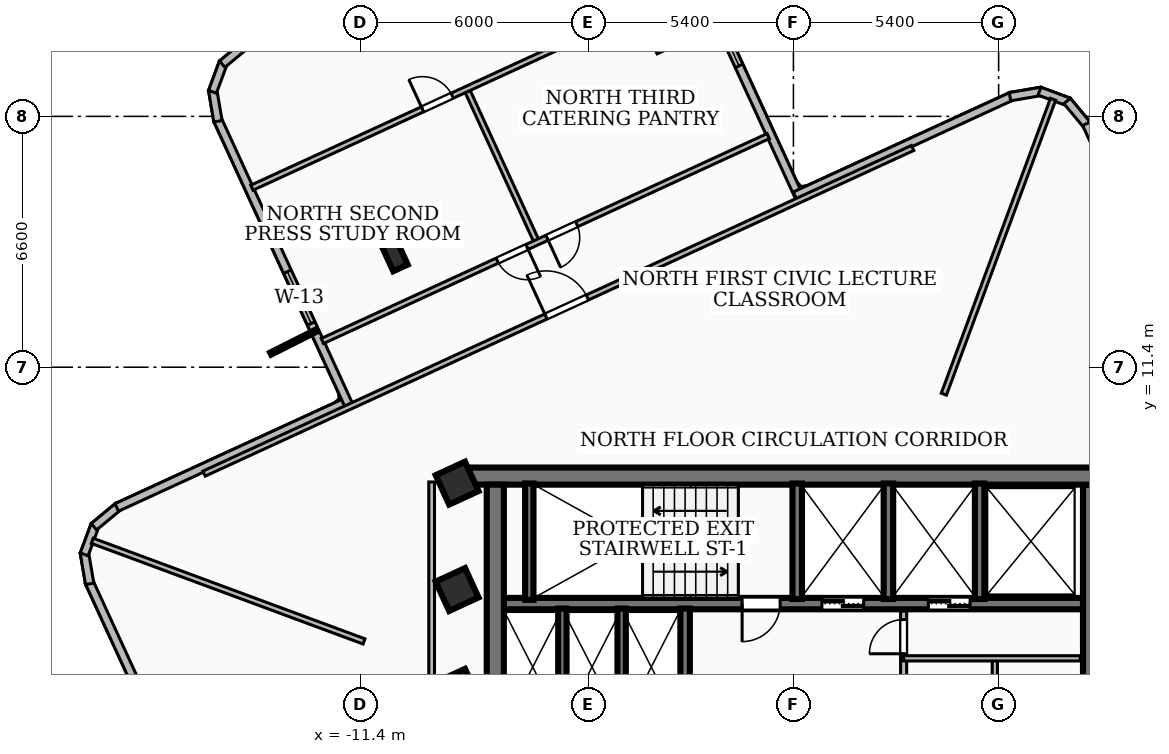
"""IFC4 building model, lengths in metres.
Left out: names, types, materials, properties, quantities, classifications, styles, units other than length and angle.
Written with IfcOpenShell. Run it as: python <this file> out.ifc"""

import sys

from ifc_helpers import new_model, si_unit, direction, frame, frame_2d, origin, origin_2d, place, context, subcontext, project, spatial, rectangle, i_section, extrude, element, fill, save


model = new_model("IFC4")
c1 = context("Model", 3, precision=1e-05, world=origin(), true_north=direction((0.0, 1.0)))
c2 = subcontext(c1, "Body", "Model", "MODEL_VIEW")
j1 = project(units=[si_unit("LENGTHUNIT", "METRE"), si_unit("PLANEANGLEUNIT", "RADIAN")], contexts=[c1])
p1 = place(None, origin())
s1 = spatial("IfcSite", under=j1, at=p1, CompositionType="ELEMENT")
p2 = place(p1, origin())
s2 = spatial("IfcBuilding", under=s1, at=p2, CompositionType="ELEMENT")
p3 = place(p2, frame((0.0, 0.0, 184.68)))
s3 = spatial("IfcBuildingStorey", under=s2, at=p3, CompositionType="ELEMENT", Elevation=184.68)
p4 = place(p3, frame((-8.78, 8.535, 0.0), z_axis=(0.0, 0.0, 1.0), x_axis=(1.0, 0.0, 0.0)))
e1 = element("IfcWall", 1, at=p4, inside=s3, PredefinedType="SHEAR", context=c2, shape_type="SweptSolid", body=[
    extrude(rectangle(XDim=17.56, YDim=0.45, at=frame_2d((8.78, 0.0))), origin(), (0.0, 0.0, 1.0), 3.34),
])
for number, where, z_axis, x_axis in (
    (2, (-7.845, 1.975, 0.0), (0.0, 0.0, 1.0), (0.0, 1.0, 0.0)),
    (3, (7.845, 8.31, 0.0), (0.0, 0.0, 1.0), (0.0, -1.0, 0.0)),
):
    element("IfcWall", number, at=place(p3, frame(where, z_axis=z_axis, x_axis=x_axis)), inside=s3, PredefinedType="SHEAR", context=c2, shape_type="SweptSolid", body=[
        extrude(rectangle(XDim=6.335, YDim=0.45, at=frame_2d((3.167, 0.0))), origin(), (0.0, 0.0, 1.0), 3.34),
    ])
p5 = place(p3, frame((7.62, 5.18, 0.0), z_axis=(0.0, 0.0, 1.0), x_axis=(-1.0, 0.0, 0.0)))
e4 = element("IfcWall", 4, at=p5, inside=s3, PredefinedType="SOLIDWALL", context=c2, shape_type="SweptSolid", body=[
    extrude(rectangle(XDim=15.24, YDim=0.3, at=frame_2d((7.62, 0.0))), origin(), (0.0, 0.0, 1.0), 3.34),
])
p6 = place(p5, frame((5.77, 0.0, 0.0)))
e5 = element("IfcOpeningElement", 5, at=p6, cuts=e4, PredefinedType="OPENING", context=c2, shape_type="SweptSolid", body=[
    extrude(rectangle(XDim=1.1, YDim=2.15, at=frame_2d((0.55, 1.075))), frame((0.0, 0.16, 0.0), z_axis=(0.0, -1.0, 0.0), x_axis=(1.0, 0.0, 0.0)), (0.0, 0.0, 1.0), 0.32),
])
p7 = place(p5, frame((2.97, 0.0, 0.0)))
e6 = element("IfcOpeningElement", 6, at=p7, cuts=e4, PredefinedType="OPENING", context=c2, shape_type="SweptSolid", body=[
    extrude(rectangle(XDim=1.1, YDim=2.15, at=frame_2d((0.55, 1.075))), frame((0.0, 0.16, 0.0), z_axis=(0.0, -1.0, 0.0), x_axis=(1.0, 0.0, 0.0)), (0.0, 0.0, 1.0), 0.32),
])
p8 = place(p5, frame((7.97, 0.0, 0.0)))
e7 = element("IfcOpeningElement", 7, at=p8, cuts=e4, PredefinedType="OPENING", context=c2, shape_type="SweptSolid", body=[
    extrude(rectangle(XDim=1.0, YDim=2.1, at=frame_2d((0.5, 1.05))), frame((0.0, 0.16, 0.0), z_axis=(0.0, -1.0, 0.0), x_axis=(1.0, 0.0, 0.0)), (0.0, 0.0, 1.0), 0.32),
])
p9 = place(p3, frame((-6.95, 5.28, 0.0), z_axis=(0.0, 0.0, 1.0), x_axis=(0.0, 1.0, 0.0)))
e8 = element("IfcWall", 8, at=p9, inside=s3, PredefinedType="SOLIDWALL", context=c2, shape_type="SweptSolid", body=[
    extrude(rectangle(XDim=3.06, YDim=0.22, at=frame_2d((1.53, 0.0))), origin(), (0.0, 0.0, 1.0), 3.34),
])
for number, where, z_axis, x_axis in (
    (9, (0.1, 5.3, 0.0), (0.0, 0.0, 1.0), (0.0, 1.0, 0.0)),
    (10, (2.5, 5.3, 0.0), (0.0, 0.0, 1.0), (0.0, 1.0, 0.0)),
    (11, (4.9, 5.3, 0.0), (0.0, 0.0, 1.0), (0.0, 1.0, 0.0)),
):
    element("IfcWall", number, at=place(p3, frame(where, z_axis=z_axis, x_axis=x_axis)), inside=s3, PredefinedType="SOLIDWALL", context=c2, shape_type="SweptSolid", body=[
        extrude(rectangle(XDim=3.04, YDim=0.25, at=frame_2d((1.52, 0.0))), origin(), (0.0, 0.0, 1.0), 3.34),
    ])
p10 = place(p3, frame((-2.85, 1.98, 0.0), z_axis=(0.0, 0.0, 1.0), x_axis=(0.0, 1.0, 0.0)))
e12 = element("IfcWall", 12, at=p10, inside=s3, PredefinedType="SOLIDWALL", context=c2, shape_type="SweptSolid", body=[
    extrude(rectangle(XDim=3.07, YDim=0.25, at=frame_2d((1.535, 0.0))), origin(), (0.0, 0.0, 1.0), 3.34),
])
for number, where, z_axis, x_axis in (
    (13, (-6.08, 1.98, 0.0), (0.0, 0.0, 1.0), (0.0, 1.0, 0.0)),
    (14, (-4.52, 1.98, 0.0), (0.0, 0.0, 1.0), (0.0, 1.0, 0.0)),
):
    element("IfcWall", number, at=place(p3, frame(where, z_axis=z_axis, x_axis=x_axis)), inside=s3, PredefinedType="SOLIDWALL", context=c2, shape_type="SweptSolid", body=[
        extrude(rectangle(XDim=3.07, YDim=0.22, at=frame_2d((1.535, 0.0))), origin(), (0.0, 0.0, 1.0), 3.34),
    ])
for number, where, z_axis, x_axis in (
    (15, (-8.85, 2.9, 0.0), (0.0, 0.0, 1.0), (0.909, 0.418, 0.0)),
    (16, (-8.85, 5.55, 0.0), (0.0, 0.0, 1.0), (0.909, 0.418, 0.0)),
    (17, (-8.85, 8.35, 0.0), (0.0, 0.0, 1.0), (0.909, 0.418, 0.0)),
):
    element("IfcColumn", number, at=place(p3, frame(where, z_axis=z_axis, x_axis=x_axis)), inside=s3, PredefinedType="COLUMN", context=c2, shape_type="SweptSolid", body=[
        extrude(rectangle(XDim=0.85, YDim=0.85, at=origin_2d()), origin(), (0.0, 0.0, 1.0), 3.6),
    ])
p11 = place(p3, frame((-10.533, 14.433, 0.0), z_axis=(0.0, 0.0, 1.0), x_axis=(0.9086539853, 0.41754991917, 0.0)))
e18 = element("IfcColumn", 18, at=p11, inside=s3, PredefinedType="COLUMN", context=c2, shape_type="SweptSolid", body=[
    extrude(i_section(OverallWidth=0.418, OverallDepth=0.927, WebThickness=0.019, FlangeThickness=0.032, at=origin_2d()), origin(), (0.0, 0.0, 1.0), 3.6),
])
p12 = place(p3, frame((-15.911, 0.042, 0.0), z_axis=(0.0, 0.0, 1.0), x_axis=(-0.417479344719, 0.908686412759, 0.0)))
e19 = element("IfcWall", 19, at=p12, inside=s3, PredefinedType="SOLIDWALL", context=c2, shape_type="SweptSolid", body=[
    extrude(rectangle(XDim=6.278, YDim=0.22, at=frame_2d((3.139, 0.0))), origin(), (0.0, 0.0, 1.0), 3.34),
])
p13 = place(p3, frame((-18.518, 5.699, 0.0), z_axis=(0.0, 0.0, 1.0), x_axis=(-0.167382556682, 0.985892022342, 0.0)))
e20 = element("IfcWall", 20, at=p13, inside=s3, PredefinedType="SOLIDWALL", context=c2, shape_type="SweptSolid", body=[
    extrude(rectangle(XDim=0.836, YDim=0.22, at=frame_2d((0.418, 0.0))), origin(), (0.0, 0.0, 1.0), 3.34),
])
p14 = place(p3, frame((-18.663, 6.475, 0.0), z_axis=(0.0, 0.0, 1.0), x_axis=(0.348538641681, 0.937294412261, 0.0)))
e21 = element("IfcWall", 21, at=p14, inside=s3, PredefinedType="SOLIDWALL", context=c2, shape_type="SweptSolid", body=[
    extrude(rectangle(XDim=0.818, YDim=0.22, at=frame_2d((0.409, 0.0))), origin(), (0.0, 0.0, 1.0), 3.34),
])
p15 = place(p3, frame((-18.406, 7.203, 0.0), z_axis=(0.0, 0.0, 1.0), x_axis=(0.769323077261, 0.638859924235, 0.0)))
e22 = element("IfcWall", 22, at=p15, inside=s3, PredefinedType="SOLIDWALL", context=c2, shape_type="SweptSolid", body=[
    extrude(rectangle(XDim=0.835, YDim=0.22, at=frame_2d((0.417, 0.0))), origin(), (0.0, 0.0, 1.0), 3.34),
])
p16 = place(p3, frame((-17.806, 7.71, 0.0), z_axis=(0.0, 0.0, 1.0), x_axis=(0.908646468859, 0.417566275734, 0.0)))
e23 = element("IfcWall", 23, at=p16, inside=s3, PredefinedType="SOLIDWALL", context=c2, shape_type="SweptSolid", body=[
    extrude(rectangle(XDim=6.758, YDim=0.22, at=frame_2d((3.379, 0.0))), origin(), (0.0, 0.0, 1.0), 3.34),
])
p17 = place(p3, frame((-11.708, 10.415, 0.0), z_axis=(0.0, 0.0, 1.0), x_axis=(-0.417525901293, 0.908665021748, 0.0)))
e24 = element("IfcWall", 24, at=p17, inside=s3, PredefinedType="SOLIDWALL", context=c2, shape_type="SweptSolid", body=[
    extrude(rectangle(XDim=8.258, YDim=0.22, at=frame_2d((4.129, 0.0))), origin(), (0.0, 0.0, 1.0), 3.34),
])
p18 = place(p17, frame((2.35, 0.0, 0.85)))
e25 = element("IfcOpeningElement", 25, at=p18, cuts=e24, PredefinedType="OPENING", context=c2, shape_type="SweptSolid", body=[
    extrude(rectangle(XDim=1.5, YDim=1.8, at=frame_2d((0.75, 0.9))), frame((0.0, 0.12, 0.0), z_axis=(0.0, -1.0, 0.0), x_axis=(1.0, 0.0, 0.0)), (0.0, 0.0, 1.0), 0.24),
])
p19 = place(p3, frame((-15.142, 17.871, 0.0), z_axis=(0.0, 0.0, 1.0), x_axis=(-0.167575597201, 0.985859228908, 0.0)))
e26 = element("IfcWall", 26, at=p19, inside=s3, PredefinedType="SOLIDWALL", context=c2, shape_type="SweptSolid", body=[
    extrude(rectangle(XDim=0.835, YDim=0.22, at=frame_2d((0.417, 0.0))), origin(), (0.0, 0.0, 1.0), 3.34),
])
p20 = place(p3, frame((-15.287, 18.646, 0.0), z_axis=(0.0, 0.0, 1.0), x_axis=(0.348051853522, 0.937475283546, 0.0)))
e27 = element("IfcWall", 27, at=p20, inside=s3, PredefinedType="SOLIDWALL", context=c2, shape_type="SweptSolid", body=[
    extrude(rectangle(XDim=0.819, YDim=0.22, at=frame_2d((0.41, 0.0))), origin(), (0.0, 0.0, 1.0), 3.34),
])
p21 = place(p3, frame((-15.03, 19.375, 0.0), z_axis=(0.0, 0.0, 1.0), x_axis=(0.770042109777, 0.637993063576, 0.0)))
e28 = element("IfcWall", 28, at=p21, inside=s3, PredefinedType="SOLIDWALL", context=c2, shape_type="SweptSolid", body=[
    extrude(rectangle(XDim=0.834, YDim=0.22, at=frame_2d((0.417, 0.0))), origin(), (0.0, 0.0, 1.0), 3.34),
])
p22 = place(p3, frame((-3.289, 23.372, 0.0), z_axis=(0.0, 0.0, 1.0), x_axis=(0.417514685416, -0.90867017529, 0.0)))
e29 = element("IfcWall", 29, at=p22, inside=s3, PredefinedType="SOLIDWALL", context=c2, shape_type="SweptSolid", body=[
    extrude(rectangle(XDim=8.258, YDim=0.22, at=frame_2d((4.129, 0.0))), origin(), (0.0, 0.0, 1.0), 3.34),
])
p23 = place(p22, frame((2.35, 0.0, 0.85)))
e30 = element("IfcOpeningElement", 30, at=p23, cuts=e29, PredefinedType="OPENING", context=c2, shape_type="SweptSolid", body=[
    extrude(rectangle(XDim=2.1, YDim=1.8, at=frame_2d((1.05, 0.9))), frame((0.0, 0.12, 0.0), z_axis=(0.0, -1.0, 0.0), x_axis=(1.0, 0.0, 0.0)), (0.0, 0.0, 1.0), 0.24),
])
p24 = place(p3, frame((0.042, 15.911, 0.0), z_axis=(0.0, 0.0, 1.0), x_axis=(0.908686412759, 0.417479344719, 0.0)))
e31 = element("IfcWall", 31, at=p24, inside=s3, PredefinedType="SOLIDWALL", context=c2, shape_type="SweptSolid", body=[
    extrude(rectangle(XDim=6.278, YDim=0.22, at=frame_2d((3.139, 0.0))), origin(), (0.0, 0.0, 1.0), 3.34),
])
p25 = place(p3, frame((5.699, 18.518, 0.0), z_axis=(0.0, 0.0, 1.0), x_axis=(0.985892022342, 0.167382556682, 0.0)))
e32 = element("IfcWall", 32, at=p25, inside=s3, PredefinedType="SOLIDWALL", context=c2, shape_type="SweptSolid", body=[
    extrude(rectangle(XDim=0.836, YDim=0.22, at=frame_2d((0.418, 0.0))), origin(), (0.0, 0.0, 1.0), 3.34),
])
p26 = place(p3, frame((6.475, 18.663, 0.0), z_axis=(0.0, 0.0, 1.0), x_axis=(0.937294412261, -0.348538641681, 0.0)))
e33 = element("IfcWall", 33, at=p26, inside=s3, PredefinedType="SOLIDWALL", context=c2, shape_type="SweptSolid", body=[
    extrude(rectangle(XDim=0.818, YDim=0.22, at=frame_2d((0.409, 0.0))), origin(), (0.0, 0.0, 1.0), 3.34),
])
p27 = place(p3, frame((7.203, 18.406, 0.0), z_axis=(0.0, 0.0, 1.0), x_axis=(0.638859924235, -0.769323077261, 0.0)))
e34 = element("IfcWall", 34, at=p27, inside=s3, PredefinedType="SOLIDWALL", context=c2, shape_type="SweptSolid", body=[
    extrude(rectangle(XDim=0.835, YDim=0.22, at=frame_2d((0.417, 0.0))), origin(), (0.0, 0.0, 1.0), 3.34),
])
p28 = place(p3, frame((7.71, 17.806, 0.0), z_axis=(0.0, 0.0, 1.0), x_axis=(0.417566275734, -0.908646468859, 0.0)))
e35 = element("IfcWall", 35, at=p28, inside=s3, PredefinedType="SOLIDWALL", context=c2, shape_type="SweptSolid", body=[
    extrude(rectangle(XDim=6.758, YDim=0.22, at=frame_2d((3.379, 0.0))), origin(), (0.0, 0.0, 1.0), 3.34),
])
p29 = place(p3, frame((2.9, 2.04, 0.0), z_axis=(0.0, 0.0, 1.0), x_axis=(0.0, 1.0, 0.0)))
e36 = element("IfcWall", 36, at=p29, inside=s3, PredefinedType="PARTITIONING", context=c2, shape_type="SweptSolid", body=[
    extrude(rectangle(XDim=2.94, YDim=0.16, at=frame_2d((1.47, 0.0))), origin(), (0.0, 0.0, 1.0), 2.57),
])
p30 = place(p29, frame((1.82, 0.0, 0.0)))
e37 = element("IfcOpeningElement", 37, at=p30, cuts=e36, PredefinedType="OPENING", context=c2, shape_type="SweptSolid", body=[
    extrude(rectangle(XDim=0.9, YDim=2.06, at=frame_2d((0.45, 1.03))), frame((0.0, 0.09, 0.0), z_axis=(0.0, -1.0, 0.0), x_axis=(1.0, 0.0, 0.0)), (0.0, 0.0, 1.0), 0.18),
])
p31 = place(p3, frame((2.9, 3.74, 0.0), z_axis=(0.0, 0.0, 1.0), x_axis=(1.0, 0.0, 0.0)))
e38 = element("IfcWall", 38, at=p31, inside=s3, PredefinedType="PARTITIONING", context=c2, shape_type="SweptSolid", body=[
    extrude(rectangle(XDim=4.65, YDim=0.138, at=frame_2d((2.325, 0.0))), origin(), (0.0, 0.0, 1.0), 3.34),
])
p32 = place(p3, frame((5.3, 1.85, 0.0), z_axis=(0.0, 0.0, 1.0), x_axis=(0.0, 1.0, 0.0)))
e39 = element("IfcWall", 39, at=p32, inside=s3, PredefinedType="PARTITIONING", context=c2, shape_type="SweptSolid", body=[
    extrude(rectangle(XDim=1.89, YDim=0.138, at=frame_2d((0.945, 0.0))), origin(), (0.0, 0.0, 1.0), 2.57),
])
p33 = place(p3, frame((-9.52, 1.75, 0.0), z_axis=(0.0, 0.0, 1.0), x_axis=(0.0, 1.0, 0.0)))
e40 = element("IfcWall", 40, at=p33, inside=s3, PredefinedType="PARTITIONING", context=c2, shape_type="SweptSolid", body=[
    extrude(rectangle(XDim=6.63, YDim=0.15, at=frame_2d((3.315, 0.0))), origin(), (0.0, 0.0, 1.0), 3.34),
])
p34 = place(p3, frame((3.959, 10.691, 0.0), z_axis=(0.0, 0.0, 1.0), x_axis=(0.347243238044, 0.937775097576, 0.0)))
e41 = element("IfcWall", 41, at=p34, inside=s3, PredefinedType="PARTITIONING", context=c2, shape_type="SweptSolid", body=[
    extrude(rectangle(XDim=8.274, YDim=0.145, at=frame_2d((4.137, 0.0))), origin(), (0.0, 0.0, 1.0), 3.34),
])
p35 = place(p3, frame((-11.3, 4.185, 0.0), z_axis=(0.0, 0.0, 1.0), x_axis=(-0.937797421925, 0.347182942311, 0.0)))
e42 = element("IfcWall", 42, at=p35, inside=s3, PredefinedType="PARTITIONING", context=c2, shape_type="SweptSolid", body=[
    extrude(rectangle(XDim=7.624, YDim=0.145, at=frame_2d((3.812, 0.0))), origin(), (0.0, 0.0, 1.0), 3.34),
])
p36 = place(p3, frame((-15.508, 8.6, 0.0), z_axis=(0.0, 0.0, 1.0), x_axis=(0.908644148726, 0.41757132443, 0.0)))
e43 = element("IfcWall", 43, at=p36, inside=s3, PredefinedType="PARTITIONING", context=c2, shape_type="SweptSolid", body=[
    extrude(rectangle(XDim=20.521, YDim=0.145, at=frame_2d((10.26, 0.0))), origin(), (0.0, 0.0, 1.0), 2.644),
])
p37 = place(p36, frame((9.9, 0.0, 0.0)))
e44 = element("IfcOpeningElement", 44, at=p37, cuts=e43, PredefinedType="OPENING", context=c2, shape_type="SweptSolid", body=[
    extrude(rectangle(XDim=1.2, YDim=2.1, at=frame_2d((0.6, 1.05))), frame((0.0, 0.083, 0.0), z_axis=(0.0, -1.0, 0.0), x_axis=(1.0, 0.0, 0.0)), (0.0, 0.0, 1.0), 0.165),
])
p38 = place(p3, frame((-6.773, 14.738, 0.0), z_axis=(0.0, 0.0, 1.0), x_axis=(-0.417333699104, 0.908753312837, 0.0)))
e45 = element("IfcWall", 45, at=p38, inside=s3, PredefinedType="PARTITIONING", context=c2, shape_type="SweptSolid", body=[
    extrude(rectangle(XDim=4.32, YDim=0.145, at=frame_2d((2.16, 0.0))), origin(), (0.0, 0.0, 1.0), 3.34),
])
p39 = place(p3, frame((-0.664, 17.48, 0.0), z_axis=(0.0, 0.0, 1.0), x_axis=(-0.908648339266, -0.417562205605, 0.0)))
e46 = element("IfcWall", 46, at=p39, inside=s3, PredefinedType="PARTITIONING", context=c2, shape_type="SweptSolid", body=[
    extrude(rectangle(XDim=12.91, YDim=0.145, at=frame_2d((6.455, 0.0))), origin(), (0.0, 0.0, 1.0), 2.644),
])
p40 = place(p39, frame((5.545, 0.0, 0.0)))
e47 = element("IfcOpeningElement", 47, at=p40, cuts=e46, PredefinedType="OPENING", context=c2, shape_type="SweptSolid", body=[
    extrude(rectangle(XDim=0.86, YDim=2.04, at=frame_2d((0.43, 1.02))), frame((0.0, 0.083, 0.0), z_axis=(0.0, -1.0, 0.0), x_axis=(1.0, 0.0, 0.0)), (0.0, 0.0, 1.0), 0.165),
])
p41 = place(p39, frame((6.985, 0.0, 0.0)))
e48 = element("IfcOpeningElement", 48, at=p41, cuts=e46, PredefinedType="OPENING", context=c2, shape_type="SweptSolid", body=[
    extrude(rectangle(XDim=0.86, YDim=2.04, at=frame_2d((0.43, 1.02))), frame((0.0, 0.083, 0.0), z_axis=(0.0, -1.0, 0.0), x_axis=(1.0, 0.0, 0.0)), (0.0, 0.0, 1.0), 0.165),
])
p42 = place(p3, frame((-14.249, 16.123, 0.0), z_axis=(0.0, 0.0, 1.0), x_axis=(0.908677037864, 0.41749974953, 0.0)))
e49 = element("IfcWall", 49, at=p42, inside=s3, PredefinedType="PARTITIONING", context=c2, shape_type="SweptSolid", body=[
    extrude(rectangle(XDim=12.91, YDim=0.145, at=frame_2d((6.455, 0.0))), origin(), (0.0, 0.0, 1.0), 3.34),
])
p43 = place(p42, frame((4.94, 0.0, 0.0)))
e50 = element("IfcOpeningElement", 50, at=p43, cuts=e49, PredefinedType="OPENING", context=c2, shape_type="SweptSolid", body=[
    extrude(rectangle(XDim=0.86, YDim=2.04, at=frame_2d((0.43, 1.02))), frame((0.0, 0.083, 0.0), z_axis=(0.0, -1.0, 0.0), x_axis=(1.0, 0.0, 0.0)), (0.0, 0.0, 1.0), 0.165),
])
p44 = place(p18, origin())
e51 = element("IfcWindow", 51, at=p44, inside=s3, PartitioningType="SINGLE_PANEL", PredefinedType="WINDOW", context=c2, shape_type="SweptSolid", body=[
    extrude(rectangle(XDim=1.5, YDim=1.8, at=frame_2d((0.75, 0.9))), frame((0.0, 0.03, 0.0), z_axis=(0.0, -1.0, 0.0), x_axis=(1.0, 0.0, 0.0)), (0.0, 0.0, 1.0), 0.06),
])
fill(e25, e51)
p45 = place(p23, origin())
e52 = element("IfcWindow", 52, at=p45, inside=s3, PartitioningType="SINGLE_PANEL", PredefinedType="WINDOW", context=c2, shape_type="SweptSolid", body=[
    extrude(rectangle(XDim=2.1, YDim=1.8, at=frame_2d((1.05, 0.9))), frame((0.0, 0.03, 0.0), z_axis=(0.0, -1.0, 0.0), x_axis=(1.0, 0.0, 0.0)), (0.0, 0.0, 1.0), 0.06),
])
fill(e30, e52)
p46 = place(p6, origin())
e53 = element("IfcDoor", 53, at=p46, inside=s3, OperationType="DOUBLE_DOOR_SLIDING", PredefinedType="DOOR", context=c2, shape_type="SweptSolid", body=[
    extrude(rectangle(XDim=1.1, YDim=2.15, at=frame_2d((0.55, 1.075))), frame((0.0, 0.025, 0.0), z_axis=(0.0, -1.0, 0.0), x_axis=(1.0, 0.0, 0.0)), (0.0, 0.0, 1.0), 0.05),
])
fill(e5, e53)
p47 = place(p7, origin())
e54 = element("IfcDoor", 54, at=p47, inside=s3, OperationType="DOUBLE_DOOR_SLIDING", PredefinedType="DOOR", context=c2, shape_type="SweptSolid", body=[
    extrude(rectangle(XDim=1.1, YDim=2.15, at=frame_2d((0.55, 1.075))), frame((0.0, 0.025, 0.0), z_axis=(0.0, -1.0, 0.0), x_axis=(1.0, 0.0, 0.0)), (0.0, 0.0, 1.0), 0.05),
])
fill(e6, e54)
p48 = place(p8, origin())
e55 = element("IfcDoor", 55, at=p48, inside=s3, OperationType="SINGLE_SWING_RIGHT", PredefinedType="DOOR", context=c2, shape_type="SweptSolid", body=[
    extrude(rectangle(XDim=1.0, YDim=2.1, at=frame_2d((0.5, 1.05))), frame((0.0, 0.025, 0.0), z_axis=(0.0, -1.0, 0.0), x_axis=(1.0, 0.0, 0.0)), (0.0, 0.0, 1.0), 0.05),
])
fill(e7, e55)
p49 = place(p30, origin())
e56 = element("IfcDoor", 56, at=p49, inside=s3, OperationType="SINGLE_SWING_LEFT", PredefinedType="DOOR", context=c2, shape_type="SweptSolid", body=[
    extrude(rectangle(XDim=0.9, YDim=2.06, at=frame_2d((0.45, 1.03))), frame((0.0, 0.025, 0.0), z_axis=(0.0, -1.0, 0.0), x_axis=(1.0, 0.0, 0.0)), (0.0, 0.0, 1.0), 0.05),
])
fill(e37, e56)
p50 = place(p37, origin())
e57 = element("IfcDoor", 57, at=p50, inside=s3, OperationType="SINGLE_SWING_LEFT", PredefinedType="DOOR", context=c2, shape_type="SweptSolid", body=[
    extrude(rectangle(XDim=1.2, YDim=2.1, at=frame_2d((0.6, 1.05))), frame((0.0, 0.025, 0.0), z_axis=(0.0, -1.0, 0.0), x_axis=(1.0, 0.0, 0.0)), (0.0, 0.0, 1.0), 0.05),
])
fill(e44, e57)
p51 = place(p40, origin())
e58 = element("IfcDoor", 58, at=p51, inside=s3, OperationType="SINGLE_SWING_RIGHT", PredefinedType="DOOR", context=c2, shape_type="SweptSolid", body=[
    extrude(rectangle(XDim=0.86, YDim=2.04, at=frame_2d((0.43, 1.02))), frame((0.0, 0.025, 0.0), z_axis=(0.0, -1.0, 0.0), x_axis=(1.0, 0.0, 0.0)), (0.0, 0.0, 1.0), 0.05),
])
fill(e47, e58)
p52 = place(p41, origin())
e59 = element("IfcDoor", 59, at=p52, inside=s3, OperationType="SINGLE_SWING_LEFT", PredefinedType="DOOR", context=c2, shape_type="SweptSolid", body=[
    extrude(rectangle(XDim=0.86, YDim=2.04, at=frame_2d((0.43, 1.02))), frame((0.0, 0.025, 0.0), z_axis=(0.0, -1.0, 0.0), x_axis=(1.0, 0.0, 0.0)), (0.0, 0.0, 1.0), 0.05),
])
fill(e48, e59)
p53 = place(p43, origin())
e60 = element("IfcDoor", 60, at=p53, inside=s3, OperationType="SINGLE_SWING_LEFT", PredefinedType="DOOR", context=c2, shape_type="SweptSolid", body=[
    extrude(rectangle(XDim=0.86, YDim=2.04, at=frame_2d((0.43, 1.02))), frame((0.0, 0.025, 0.0), z_axis=(0.0, -1.0, 0.0), x_axis=(1.0, 0.0, 0.0)), (0.0, 0.0, 1.0), 0.05),
])
fill(e50, e60)
save(model, sys.argv[1])
